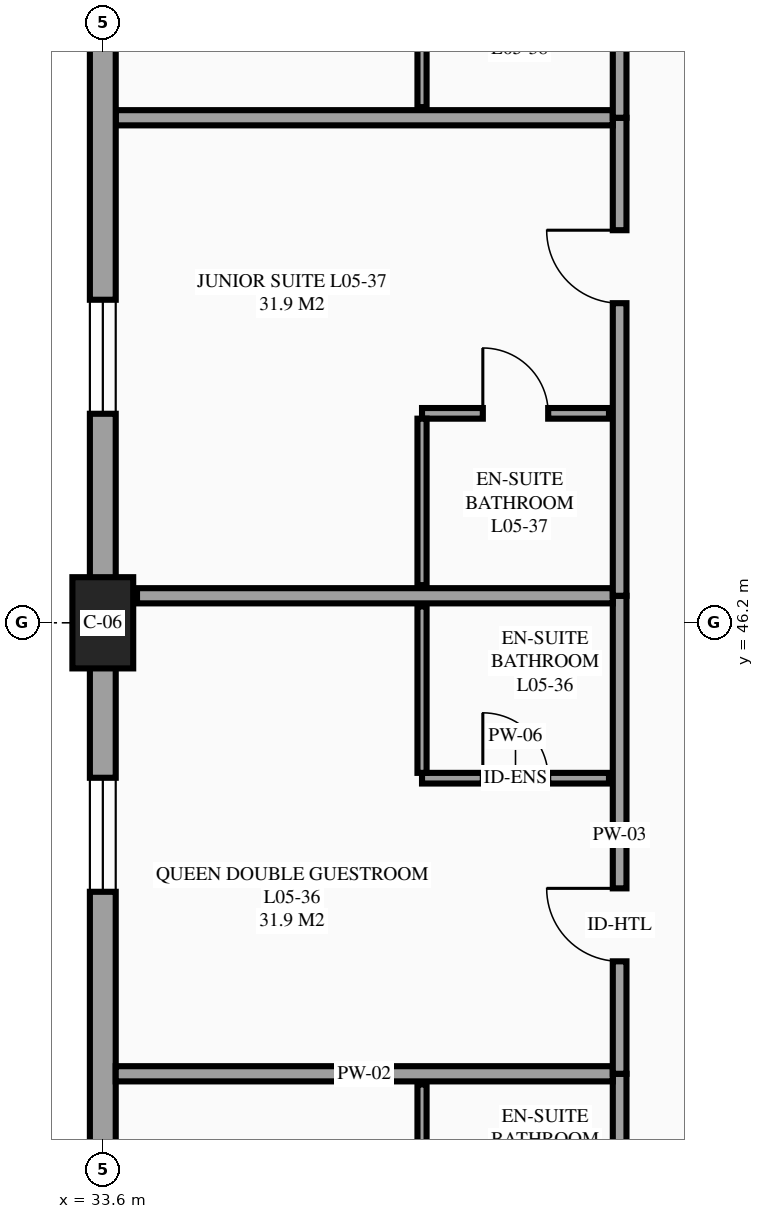
"""IFC4 building model, lengths in metres.
Left out: names, types, materials, properties, quantities, classifications, styles, units other than length and angle.
Written with IfcOpenShell. Run it as: python <this file> out.ifc"""

import sys

from ifc_helpers import new_model, si_unit, direction, frame, frame_2d, origin, origin_2d, place, context, subcontext, project, spatial, rectangle, extrude, element, fill, save


model = new_model("IFC4")
c1 = context("Model", 3, precision=1e-05, world=origin(), true_north=direction((0.0, 1.0)))
c2 = subcontext(c1, "Body", "Model", "MODEL_VIEW")
j1 = project(units=[si_unit("LENGTHUNIT", "METRE"), si_unit("PLANEANGLEUNIT", "RADIAN")], contexts=[c1])
p1 = place(None, origin())
s1 = spatial("IfcSite", under=j1, at=p1, CompositionType="ELEMENT")
p2 = place(p1, origin())
s2 = spatial("IfcBuilding", under=s1, at=p2, CompositionType="ELEMENT")
p3 = place(p2, frame((0.0, 0.0, 21.9)))
s3 = spatial("IfcBuildingStorey", under=s2, at=p3, CompositionType="ELEMENT", Elevation=21.9)
p4 = place(p3, frame((33.6, 46.2, 0.0), z_axis=(0.0, 0.0, 1.0), x_axis=(1.0, 0.0, 0.0)))
e1 = element("IfcColumn", 1, at=p4, inside=s3, PredefinedType="COLUMN", context=c2, shape_type="SweptSolid", body=[
    extrude(rectangle(XDim=0.8, YDim=1.2, at=origin_2d()), origin(), (0.0, 0.0, 1.0), 3.6),
])
p5 = place(p3, frame((33.6, 46.2, 0.0), z_axis=(0.0, 0.0, 1.0), x_axis=(0.0, -1.0, 0.0)))
e2 = element("IfcWall", 2, at=p5, inside=s3, PredefinedType="STANDARD", context=c2, shape_type="SweptSolid", body=[
    extrude(rectangle(XDim=16.8, YDim=0.34, at=frame_2d((8.4, 0.0))), origin(), (0.0, 0.0, 1.0), 2.48),
])
p6 = place(p5, frame((14.617, 0.0, 0.85)))
e3 = element("IfcOpeningElement", 3, at=p6, cuts=e2, PredefinedType="OPENING", context=c2, shape_type="SweptSolid", body=[
    extrude(rectangle(XDim=1.5, YDim=1.5, at=frame_2d((0.75, 0.75))), frame((0.0, 0.18, 0.0), z_axis=(0.0, -1.0, 0.0), x_axis=(1.0, 0.0, 0.0)), (0.0, 0.0, 1.0), 0.36),
])
p7 = place(p5, frame((9.078, 0.0, 0.85)))
e4 = element("IfcOpeningElement", 4, at=p7, cuts=e2, PredefinedType="OPENING", context=c2, shape_type="SweptSolid", body=[
    extrude(rectangle(XDim=1.5, YDim=1.5, at=frame_2d((0.75, 0.75))), frame((0.0, 0.18, 0.0), z_axis=(0.0, -1.0, 0.0), x_axis=(1.0, 0.0, 0.0)), (0.0, 0.0, 1.0), 0.36),
])
p8 = place(p5, frame((2.039, 0.0, 0.85)))
e5 = element("IfcOpeningElement", 5, at=p8, cuts=e2, PredefinedType="OPENING", context=c2, shape_type="SweptSolid", body=[
    extrude(rectangle(XDim=1.5, YDim=1.5, at=frame_2d((0.75, 0.75))), frame((0.0, 0.18, 0.0), z_axis=(0.0, -1.0, 0.0), x_axis=(1.0, 0.0, 0.0)), (0.0, 0.0, 1.0), 0.36),
])
p9 = place(p3, frame((40.4, 33.978, 0.0), z_axis=(0.0, 0.0, 1.0), x_axis=(0.0, 1.0, 0.0)))
e6 = element("IfcWall", 6, at=p9, inside=s3, PredefinedType="PARTITIONING", context=c2, shape_type="SweptSolid", body=[
    extrude(rectangle(XDim=6.289, YDim=0.18, at=frame_2d((3.145, 0.0))), origin(), (0.0, 0.0, 1.0), 3.375),
])
p10 = place(p9, frame((1.479, 0.0, 0.0)))
e7 = element("IfcOpeningElement", 7, at=p10, cuts=e6, PredefinedType="OPENING", context=c2, shape_type="SweptSolid", body=[
    extrude(rectangle(XDim=0.96, YDim=2.15, at=frame_2d((0.48, 1.075))), frame((0.0, 0.1, 0.0), z_axis=(0.0, -1.0, 0.0), x_axis=(1.0, 0.0, 0.0)), (0.0, 0.0, 1.0), 0.2),
])
p11 = place(p3, frame((33.77, 40.267, 0.0), z_axis=(0.0, 0.0, 1.0), x_axis=(1.0, 0.0, 0.0)))
e8 = element("IfcWall", 8, at=p11, inside=s3, PredefinedType="PARTITIONING", context=c2, shape_type="SweptSolid", body=[
    extrude(rectangle(XDim=6.54, YDim=0.2, at=frame_2d((3.27, 0.0))), origin(), (0.0, 0.0, 1.0), 3.375),
])
p12 = place(p3, frame((37.8, 37.937, 0.0), z_axis=(0.0, 0.0, 1.0), x_axis=(0.0, 1.0, 0.0)))
e9 = element("IfcWall", 9, at=p12, inside=s3, PredefinedType="PARTITIONING", context=c2, shape_type="SweptSolid", body=[
    extrude(rectangle(XDim=2.19, YDim=0.12, at=frame_2d((1.095, 0.0))), origin(), (0.0, 0.0, 1.0), 3.375),
])
p13 = place(p3, frame((40.4, 40.267, 0.0), z_axis=(0.0, 0.0, 1.0), x_axis=(0.0, 1.0, 0.0)))
e10 = element("IfcWall", 10, at=p13, inside=s3, PredefinedType="PARTITIONING", context=c2, shape_type="SweptSolid", body=[
    extrude(rectangle(XDim=6.289, YDim=0.18, at=frame_2d((3.145, 0.0))), origin(), (0.0, 0.0, 1.0), 3.375),
])
p14 = place(p13, frame((1.479, 0.0, 0.0)))
e11 = element("IfcOpeningElement", 11, at=p14, cuts=e10, PredefinedType="OPENING", context=c2, shape_type="SweptSolid", body=[
    extrude(rectangle(XDim=0.96, YDim=2.15, at=frame_2d((0.48, 1.075))), frame((0.0, 0.1, 0.0), z_axis=(0.0, -1.0, 0.0), x_axis=(1.0, 0.0, 0.0)), (0.0, 0.0, 1.0), 0.2),
])
p15 = place(p3, frame((34.05, 46.556, 0.0), z_axis=(0.0, 0.0, 1.0), x_axis=(1.0, 0.0, 0.0)))
e12 = element("IfcWall", 12, at=p15, inside=s3, PredefinedType="PARTITIONING", context=c2, shape_type="SweptSolid", body=[
    extrude(rectangle(XDim=6.26, YDim=0.2, at=frame_2d((3.13, 0.0))), origin(), (0.0, 0.0, 1.0), 3.375),
])
p16 = place(p3, frame((37.8, 44.156, 0.0), z_axis=(0.0, 0.0, 1.0), x_axis=(1.0, 0.0, 0.0)))
e13 = element("IfcWall", 13, at=p16, inside=s3, PredefinedType="PARTITIONING", context=c2, shape_type="SweptSolid", body=[
    extrude(rectangle(XDim=2.46, YDim=0.14, at=frame_2d((1.23, 0.0))), origin(), (0.0, 0.0, 1.0), 3.375),
])
p17 = place(p16, frame((0.8, 0.0, 0.0)))
e14 = element("IfcOpeningElement", 14, at=p17, cuts=e13, PredefinedType="OPENING", context=c2, shape_type="SweptSolid", body=[
    extrude(rectangle(XDim=0.86, YDim=2.1, at=frame_2d((0.43, 1.05))), frame((0.0, 0.08, 0.0), z_axis=(0.0, -1.0, 0.0), x_axis=(1.0, 0.0, 0.0)), (0.0, 0.0, 1.0), 0.16),
])
p18 = place(p3, frame((37.8, 44.226, 0.0), z_axis=(0.0, 0.0, 1.0), x_axis=(0.0, 1.0, 0.0)))
e15 = element("IfcWall", 15, at=p18, inside=s3, PredefinedType="PARTITIONING", context=c2, shape_type="SweptSolid", body=[
    extrude(rectangle(XDim=2.19, YDim=0.12, at=frame_2d((1.095, 0.0))), origin(), (0.0, 0.0, 1.0), 3.375),
])
p19 = place(p3, frame((40.4, 46.556, 0.0), z_axis=(0.0, 0.0, 1.0), x_axis=(0.0, 1.0, 0.0)))
e16 = element("IfcWall", 16, at=p19, inside=s3, PredefinedType="PARTITIONING", context=c2, shape_type="SweptSolid", body=[
    extrude(rectangle(XDim=6.289, YDim=0.18, at=frame_2d((3.145, 0.0))), origin(), (0.0, 0.0, 1.0), 3.375),
])
p20 = place(p19, frame((3.849, 0.0, 0.0)))
e17 = element("IfcOpeningElement", 17, at=p20, cuts=e16, PredefinedType="OPENING", context=c2, shape_type="SweptSolid", body=[
    extrude(rectangle(XDim=0.96, YDim=2.15, at=frame_2d((0.48, 1.075))), frame((0.0, 0.1, 0.0), z_axis=(0.0, -1.0, 0.0), x_axis=(1.0, 0.0, 0.0)), (0.0, 0.0, 1.0), 0.2),
])
p21 = place(p3, frame((33.77, 52.844, 0.0), z_axis=(0.0, 0.0, 1.0), x_axis=(1.0, 0.0, 0.0)))
e18 = element("IfcWall", 18, at=p21, inside=s3, PredefinedType="PARTITIONING", context=c2, shape_type="SweptSolid", body=[
    extrude(rectangle(XDim=6.54, YDim=0.2, at=frame_2d((3.27, 0.0))), origin(), (0.0, 0.0, 1.0), 3.375),
])
p22 = place(p3, frame((37.8, 48.956, 0.0), z_axis=(0.0, 0.0, 1.0), x_axis=(1.0, 0.0, 0.0)))
e19 = element("IfcWall", 19, at=p22, inside=s3, PredefinedType="PARTITIONING", context=c2, shape_type="SweptSolid", body=[
    extrude(rectangle(XDim=2.46, YDim=0.14, at=frame_2d((1.23, 0.0))), origin(), (0.0, 0.0, 1.0), 3.375),
])
p23 = place(p22, frame((0.8, 0.0, 0.0)))
e20 = element("IfcOpeningElement", 20, at=p23, cuts=e19, PredefinedType="OPENING", context=c2, shape_type="SweptSolid", body=[
    extrude(rectangle(XDim=0.86, YDim=2.1, at=frame_2d((0.43, 1.05))), frame((0.0, 0.08, 0.0), z_axis=(0.0, -1.0, 0.0), x_axis=(1.0, 0.0, 0.0)), (0.0, 0.0, 1.0), 0.16),
])
p24 = place(p3, frame((37.8, 46.696, 0.0), z_axis=(0.0, 0.0, 1.0), x_axis=(0.0, 1.0, 0.0)))
e21 = element("IfcWall", 21, at=p24, inside=s3, PredefinedType="PARTITIONING", context=c2, shape_type="SweptSolid", body=[
    extrude(rectangle(XDim=2.19, YDim=0.12, at=frame_2d((1.095, 0.0))), origin(), (0.0, 0.0, 1.0), 3.375),
])
p25 = place(p3, frame((40.4, 52.844, 0.0), z_axis=(0.0, 0.0, 1.0), x_axis=(0.0, 1.0, 0.0)))
e22 = element("IfcWall", 22, at=p25, inside=s3, PredefinedType="PARTITIONING", context=c2, shape_type="SweptSolid", body=[
    extrude(rectangle(XDim=6.289, YDim=0.18, at=frame_2d((3.145, 0.0))), origin(), (0.0, 0.0, 1.0), 3.375),
])
p26 = place(p25, frame((3.85, 0.0, 0.0)))
e23 = element("IfcOpeningElement", 23, at=p26, cuts=e22, PredefinedType="OPENING", context=c2, shape_type="SweptSolid", body=[
    extrude(rectangle(XDim=0.96, YDim=2.15, at=frame_2d((0.48, 1.075))), frame((0.0, 0.1, 0.0), z_axis=(0.0, -1.0, 0.0), x_axis=(1.0, 0.0, 0.0)), (0.0, 0.0, 1.0), 0.2),
])
p27 = place(p3, frame((37.8, 52.984, 0.0), z_axis=(0.0, 0.0, 1.0), x_axis=(0.0, 1.0, 0.0)))
e24 = element("IfcWall", 24, at=p27, inside=s3, PredefinedType="PARTITIONING", context=c2, shape_type="SweptSolid", body=[
    extrude(rectangle(XDim=2.19, YDim=0.12, at=frame_2d((1.095, 0.0))), origin(), (0.0, 0.0, 1.0), 3.375),
])
p28 = place(p3, frame((33.6, 54.6, 0.0), z_axis=(0.0, 0.0, 1.0), x_axis=(0.0, -1.0, 0.0)))
e25 = element("IfcWall", 25, at=p28, inside=s3, PredefinedType="STANDARD", context=c2, shape_type="SweptSolid", body=[
    extrude(rectangle(XDim=8.4, YDim=0.34, at=frame_2d((4.2, 0.0))), origin(), (0.0, 0.0, 1.0), 2.58),
])
p29 = place(p28, frame((4.15, 0.0, 0.85)))
e26 = element("IfcOpeningElement", 26, at=p29, cuts=e25, PredefinedType="OPENING", context=c2, shape_type="SweptSolid", body=[
    extrude(rectangle(XDim=1.5, YDim=1.5, at=frame_2d((0.75, 0.75))), frame((0.0, 0.18, 0.0), z_axis=(0.0, -1.0, 0.0), x_axis=(1.0, 0.0, 0.0)), (0.0, 0.0, 1.0), 0.36),
])
p30 = place(p8, origin())
e27 = element("IfcWindow", 27, at=p30, inside=s3, PartitioningType="SINGLE_PANEL", PredefinedType="WINDOW", context=c2, shape_type="SweptSolid", body=[
    extrude(rectangle(XDim=1.5, YDim=1.5, at=frame_2d((0.75, 0.75))), frame((0.0, 0.03, 0.0), z_axis=(0.0, -1.0, 0.0), x_axis=(1.0, 0.0, 0.0)), (0.0, 0.0, 1.0), 0.06),
])
fill(e5, e27)
p31 = place(p29, origin())
e28 = element("IfcWindow", 28, at=p31, inside=s3, PartitioningType="SINGLE_PANEL", PredefinedType="WINDOW", context=c2, shape_type="SweptSolid", body=[
    extrude(rectangle(XDim=1.5, YDim=1.5, at=frame_2d((0.75, 0.75))), frame((0.0, 0.03, 0.0), z_axis=(0.0, -1.0, 0.0), x_axis=(1.0, 0.0, 0.0)), (0.0, 0.0, 1.0), 0.06),
])
fill(e26, e28)
p32 = place(p14, origin())
e29 = element("IfcDoor", 29, at=p32, inside=s3, OperationType="SINGLE_SWING_RIGHT", PredefinedType="DOOR", context=c2, shape_type="SweptSolid", body=[
    extrude(rectangle(XDim=0.96, YDim=2.15, at=frame_2d((0.48, 1.075))), frame((0.0, 0.025, 0.0), z_axis=(0.0, -1.0, 0.0), x_axis=(1.0, 0.0, 0.0)), (0.0, 0.0, 1.0), 0.05),
])
fill(e11, e29)
p33 = place(p17, origin())
e30 = element("IfcDoor", 30, at=p33, inside=s3, OperationType="SINGLE_SWING_LEFT", PredefinedType="DOOR", context=c2, shape_type="SweptSolid", body=[
    extrude(rectangle(XDim=0.86, YDim=2.1, at=frame_2d((0.43, 1.05))), frame((0.0, 0.025, 0.0), z_axis=(0.0, -1.0, 0.0), x_axis=(1.0, 0.0, 0.0)), (0.0, 0.0, 1.0), 0.05),
])
fill(e14, e30)
p34 = place(p20, origin())
e31 = element("IfcDoor", 31, at=p34, inside=s3, OperationType="SINGLE_SWING_RIGHT", PredefinedType="DOOR", context=c2, shape_type="SweptSolid", body=[
    extrude(rectangle(XDim=0.96, YDim=2.15, at=frame_2d((0.48, 1.075))), frame((0.0, 0.025, 0.0), z_axis=(0.0, -1.0, 0.0), x_axis=(1.0, 0.0, 0.0)), (0.0, 0.0, 1.0), 0.05),
])
fill(e17, e31)
p35 = place(p23, origin())
e32 = element("IfcDoor", 32, at=p35, inside=s3, OperationType="SINGLE_SWING_LEFT", PredefinedType="DOOR", context=c2, shape_type="SweptSolid", body=[
    extrude(rectangle(XDim=0.86, YDim=2.1, at=frame_2d((0.43, 1.05))), frame((0.0, 0.025, 0.0), z_axis=(0.0, -1.0, 0.0), x_axis=(1.0, 0.0, 0.0)), (0.0, 0.0, 1.0), 0.05),
])
fill(e20, e32)
save(model, sys.argv[1])
